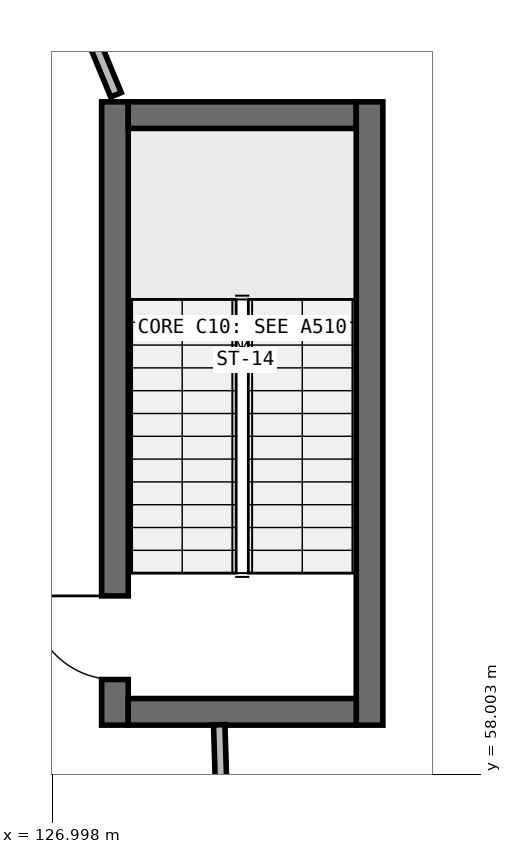
"""IFC4 building model, lengths in metres.
Left out: names, types, materials, properties, quantities, classifications, styles, units other than length and angle.
Written with IfcOpenShell. Run it as: python <this file> out.ifc"""

import sys

from ifc_helpers import new_model, si_unit, direction, frame, frame_2d, origin, place, context, subcontext, project, spatial, rectangle, extrude, element, fill, save


model = new_model("IFC4")
c1 = context("Model", 3, precision=1e-05, world=origin(), true_north=direction((0.0, 1.0)))
c2 = subcontext(c1, "Body", "Model", "MODEL_VIEW")
j1 = project(units=[si_unit("LENGTHUNIT", "METRE"), si_unit("PLANEANGLEUNIT", "RADIAN")], contexts=[c1])
p1 = place(None, origin())
s1 = spatial("IfcSite", under=j1, at=p1, CompositionType="ELEMENT")
p2 = place(p1, origin())
s2 = spatial("IfcBuilding", under=s1, at=p2, CompositionType="ELEMENT")
p3 = place(p2, frame((0.0, 0.0, 9.8)))
s3 = spatial("IfcBuildingStorey", under=s2, at=p3, CompositionType="ELEMENT", Elevation=9.8)
p4 = place(p3, frame((127.825, 58.65, 0.0), z_axis=(0.0, 0.0, 1.0), x_axis=(0.0, 1.0, 0.0)))
e1 = element("IfcWall", 1, at=p4, inside=s3, PredefinedType="SHEAR", context=c2, shape_type="SweptSolid", body=[
    extrude(rectangle(XDim=8.2, YDim=0.35, at=frame_2d((4.1, 0.0))), origin(), (0.0, 0.0, 1.0), 4.55),
])
p5 = place(p4, frame((0.6, 0.0, 0.0)))
e2 = element("IfcOpeningElement", 2, at=p5, cuts=e1, PredefinedType="OPENING", context=c2, shape_type="SweptSolid", body=[
    extrude(rectangle(XDim=1.1, YDim=2.15, at=frame_2d((0.55, 1.075))), frame((0.0, 0.185, 0.0), z_axis=(0.0, -1.0, 0.0), x_axis=(1.0, 0.0, 0.0)), (0.0, 0.0, 1.0), 0.37),
])
p6 = place(p3, frame((128.0, 66.675, 0.0), z_axis=(0.0, 0.0, 1.0), x_axis=(1.0, 0.0, 0.0)))
e3 = element("IfcWall", 3, at=p6, inside=s3, PredefinedType="SHEAR", context=c2, shape_type="SweptSolid", body=[
    extrude(rectangle(XDim=3.0, YDim=0.35, at=frame_2d((1.5, 0.0))), origin(), (0.0, 0.0, 1.0), 4.55),
])
p7 = place(p3, frame((131.175, 66.85, 0.0), z_axis=(0.0, 0.0, 1.0), x_axis=(0.0, -1.0, 0.0)))
e4 = element("IfcWall", 4, at=p7, inside=s3, PredefinedType="SHEAR", context=c2, shape_type="SweptSolid", body=[
    extrude(rectangle(XDim=8.2, YDim=0.35, at=frame_2d((4.1, 0.0))), origin(), (0.0, 0.0, 1.0), 4.55),
])
p8 = place(p3, frame((131.0, 58.825, 0.0), z_axis=(0.0, 0.0, 1.0), x_axis=(-1.0, 0.0, 0.0)))
e5 = element("IfcWall", 5, at=p8, inside=s3, PredefinedType="SHEAR", context=c2, shape_type="SweptSolid", body=[
    extrude(rectangle(XDim=3.0, YDim=0.35, at=frame_2d((1.5, 0.0))), origin(), (0.0, 0.0, 1.0), 4.55),
])
p9 = place(p3, frame((129.28, 56.0, 0.0), z_axis=(0.0, 0.0, 1.0), x_axis=(-0.031249099163, 0.999511627647, 0.0)))
e6 = element("IfcWall", 6, at=p9, inside=s3, PredefinedType="PARTITIONING", context=c2, shape_type="SweptSolid", body=[
    extrude(rectangle(XDim=2.656, YDim=0.15, at=frame_2d((1.328, 0.0))), origin(), (0.0, 0.0, 1.0), 4.3),
])
p10 = place(p3, frame((127.839, 66.943, 0.0), z_axis=(0.0, 0.0, 1.0), x_axis=(-0.382644845446, 0.923895514793, 0.0)))
e7 = element("IfcWall", 7, at=p10, inside=s3, PredefinedType="PARTITIONING", context=c2, shape_type="SweptSolid", body=[
    extrude(rectangle(XDim=11.037, YDim=0.15, at=frame_2d((5.518, 0.0))), origin(), (0.0, 0.0, 1.0), 3.737),
])
p11 = place(p10, frame((4.95, 0.0, 0.0)))
e8 = element("IfcOpeningElement", 8, at=p11, cuts=e7, PredefinedType="OPENING", context=c2, shape_type="SweptSolid", body=[
    extrude(rectangle(XDim=1.1, YDim=2.2, at=frame_2d((0.55, 1.1))), frame((0.0, 0.085, 0.0), z_axis=(0.0, -1.0, 0.0), x_axis=(1.0, 0.0, 0.0)), (0.0, 0.0, 1.0), 0.17),
])
p12 = place(p5, origin())
e9 = element("IfcDoor", 9, at=p12, inside=s3, OperationType="SINGLE_SWING_RIGHT", PredefinedType="DOOR", context=c2, shape_type="SweptSolid", body=[
    extrude(rectangle(XDim=1.1, YDim=2.15, at=frame_2d((0.55, 1.075))), frame((0.0, 0.025, 0.0), z_axis=(0.0, -1.0, 0.0), x_axis=(1.0, 0.0, 0.0)), (0.0, 0.0, 1.0), 0.05),
])
fill(e2, e9)
save(model, sys.argv[1])
